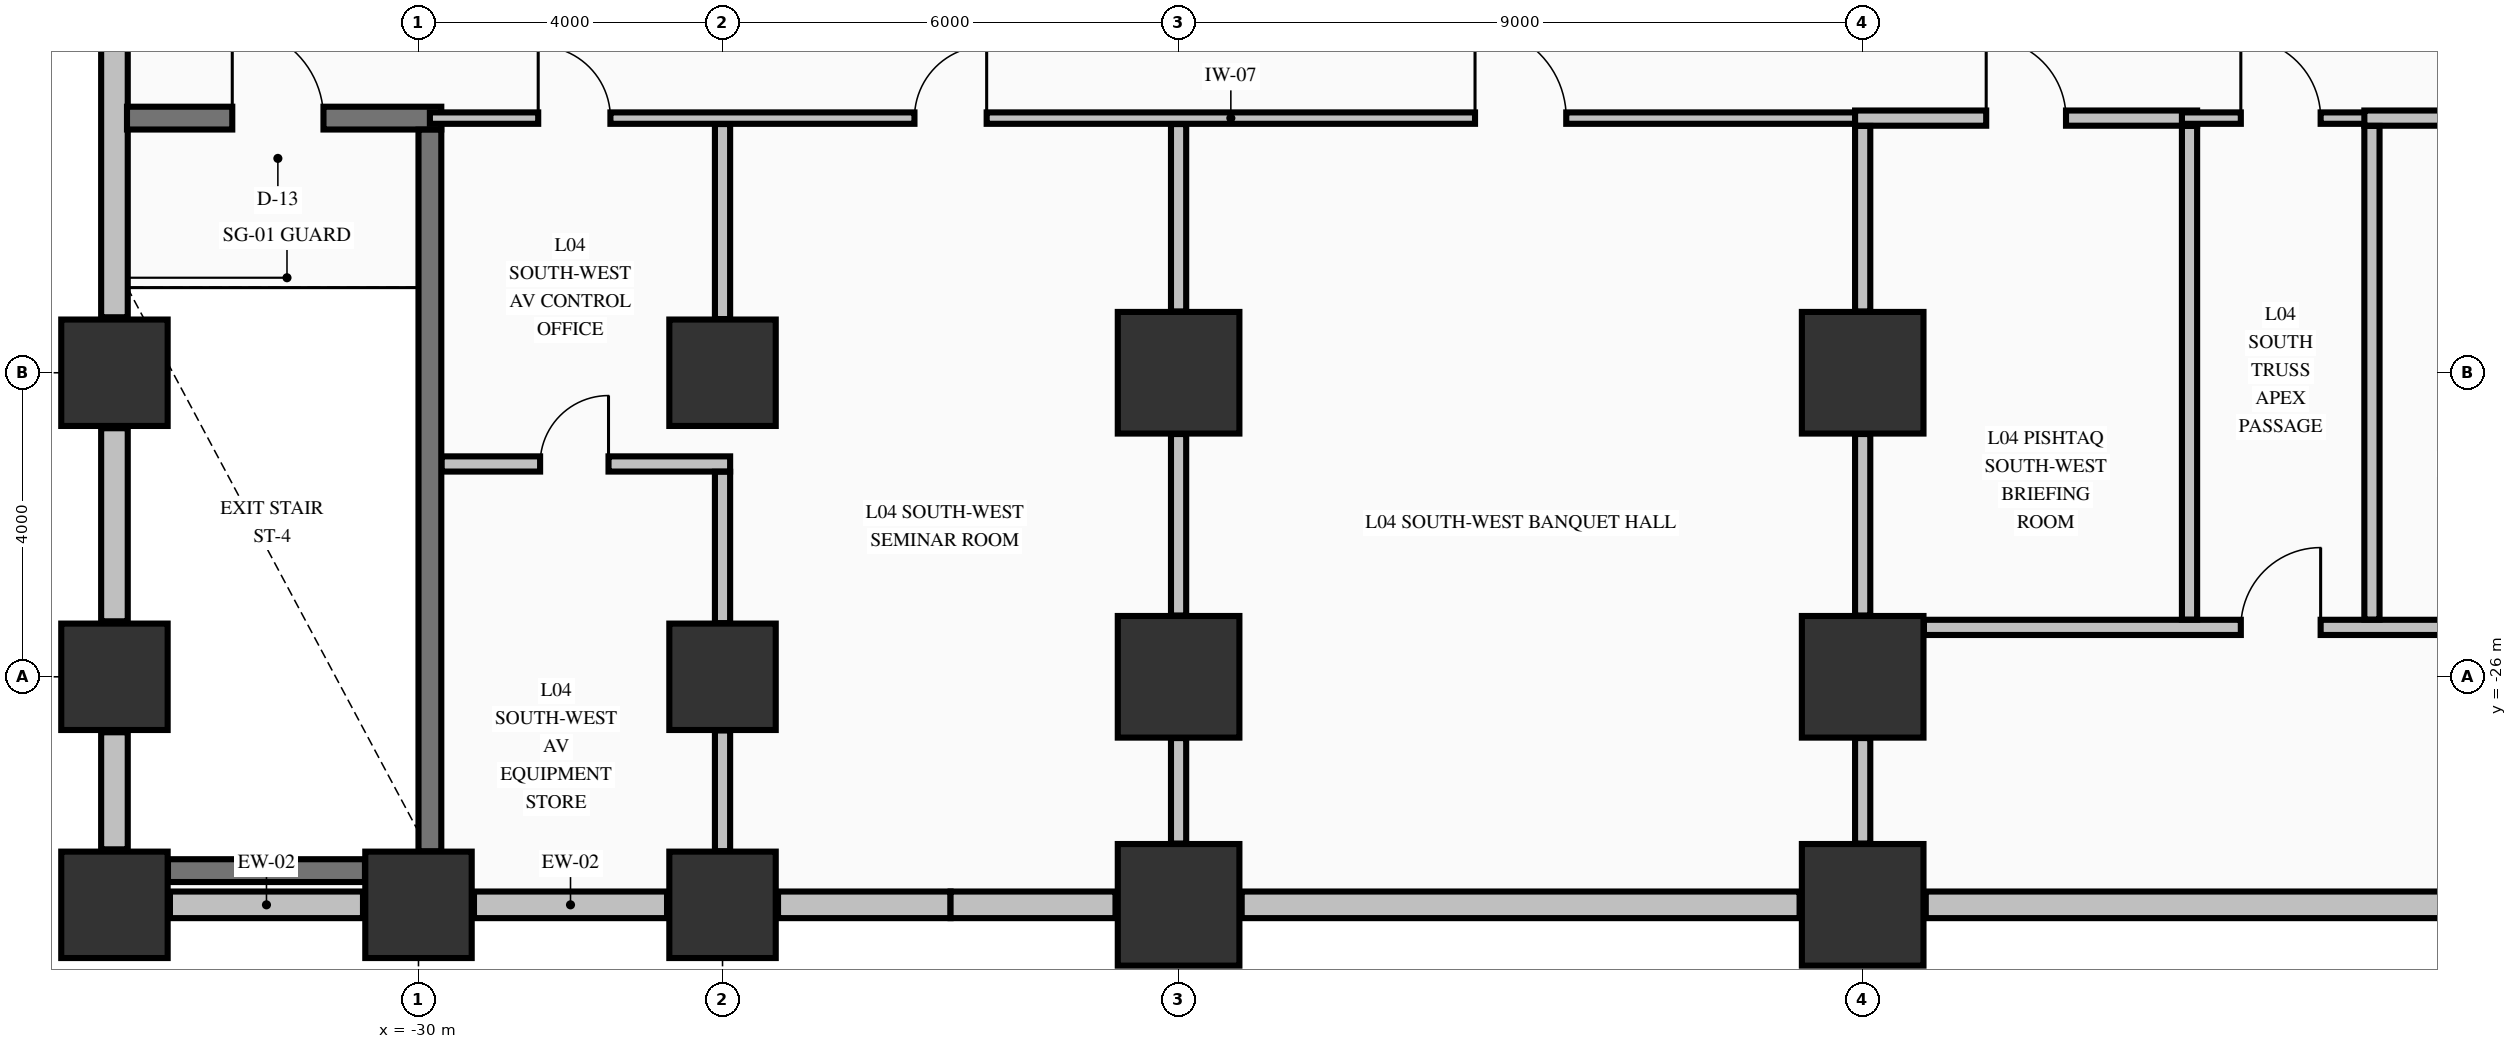
"""IFC4 building model, lengths in metres.
Left out: names, types, materials, properties, quantities, classifications, styles, units other than length and angle.
Written with IfcOpenShell. Run it as: python <this file> out.ifc"""

import sys

from ifc_helpers import new_model, si_unit, direction, frame, frame_2d, origin, origin_2d, place, context, subcontext, project, spatial, rectangle, extrude, element, fill, save


model = new_model("IFC4")
c1 = context("Model", 3, precision=1e-05, world=origin(), true_north=direction((0.0, 1.0)))
c2 = subcontext(c1, "Body", "Model", "MODEL_VIEW")
j1 = project(units=[si_unit("LENGTHUNIT", "METRE"), si_unit("PLANEANGLEUNIT", "RADIAN")], contexts=[c1])
p1 = place(None, origin())
s1 = spatial("IfcSite", under=j1, at=p1, CompositionType="ELEMENT")
p2 = place(p1, origin())
s2 = spatial("IfcBuilding", under=s1, at=p2, CompositionType="ELEMENT")
p3 = place(p2, frame((0.0, 0.0, 21.76)))
s3 = spatial("IfcBuildingStorey", under=s2, at=p3, CompositionType="ELEMENT", Elevation=21.76)
for number, where, z_axis, x_axis in (
    (1, (-34.0, -29.0, -0.45), (0.0, 0.0, 1.0), (1.0, 0.0, 0.0)),
    (2, (-34.0, -26.0, -0.45), (0.0, 0.0, 1.0), (1.0, 0.0, 0.0)),
    (3, (-34.0, -22.0, -0.45), (0.0, 0.0, 1.0), (1.0, 0.0, 0.0)),
    (4, (-30.0, -29.0, -0.45), (0.0, 0.0, 1.0), (1.0, 0.0, 0.0)),
    (5, (-26.0, -29.0, -0.45), (0.0, 0.0, 1.0), (1.0, 0.0, 0.0)),
    (6, (-26.0, -26.0, -0.45), (0.0, 0.0, 1.0), (1.0, 0.0, 0.0)),
    (7, (-26.0, -22.0, -0.45), (0.0, 0.0, 1.0), (1.0, 0.0, 0.0)),
):
    element("IfcColumn", number, at=place(p3, frame(where, z_axis=z_axis, x_axis=x_axis)), inside=s3, PredefinedType="COLUMN", context=c2, shape_type="SweptSolid", body=[
        extrude(rectangle(XDim=1.4, YDim=1.4, at=origin_2d()), origin(), (0.0, 0.0, 1.0), 5.44),
    ])
for number, where, z_axis, x_axis in (
    (8, (-20.0, -29.0, -0.45), (0.0, 0.0, 1.0), (1.0, 0.0, 0.0)),
    (9, (-20.0, -26.0, -0.45), (0.0, 0.0, 1.0), (1.0, 0.0, 0.0)),
    (10, (-20.0, -22.0, -0.45), (0.0, 0.0, 1.0), (1.0, 0.0, 0.0)),
    (11, (-11.0, -29.0, -0.45), (0.0, 0.0, 1.0), (1.0, 0.0, 0.0)),
    (12, (-11.0, -26.0, -0.45), (0.0, 0.0, 1.0), (1.0, 0.0, 0.0)),
    (13, (-11.0, -22.0, -0.45), (0.0, 0.0, 1.0), (1.0, 0.0, 0.0)),
):
    element("IfcColumn", number, at=place(p3, frame(where, z_axis=z_axis, x_axis=x_axis)), inside=s3, PredefinedType="COLUMN", context=c2, shape_type="SweptSolid", body=[
        extrude(rectangle(XDim=1.6, YDim=1.6, at=origin_2d()), origin(), (0.0, 0.0, 1.0), 5.44),
    ])
for number, where, z_axis, x_axis in (
    (14, (-33.27, -29.0, 0.0), (0.0, 0.0, 1.0), (1.0, 0.0, 0.0)),
    (15, (-29.27, -29.0, 0.0), (0.0, 0.0, 1.0), (1.0, 0.0, 0.0)),
):
    element("IfcWall", number, at=place(p3, frame(where, z_axis=z_axis, x_axis=x_axis)), inside=s3, PredefinedType="STANDARD", context=c2, shape_type="SweptSolid", body=[
        extrude(rectangle(XDim=2.54, YDim=0.35, at=frame_2d((1.27, 0.0))), origin(), (0.0, 0.0, 1.0), 3.332),
    ])
p4 = place(p3, frame((-25.27, -29.0, 0.0), z_axis=(0.0, 0.0, 1.0), x_axis=(1.0, 0.0, 0.0)))
e16 = element("IfcWall", 16, at=p4, inside=s3, PredefinedType="STANDARD", context=c2, shape_type="SweptSolid", body=[
    extrude(rectangle(XDim=2.27, YDim=0.35, at=frame_2d((1.135, 0.0))), origin(), (0.0, 0.0, 1.0), 3.332),
])
p5 = place(p3, frame((-23.0, -29.0, 0.0), z_axis=(0.0, 0.0, 1.0), x_axis=(1.0, 0.0, 0.0)))
e17 = element("IfcWall", 17, at=p5, inside=s3, PredefinedType="STANDARD", context=c2, shape_type="SweptSolid", body=[
    extrude(rectangle(XDim=2.17, YDim=0.35, at=frame_2d((1.085, 0.0))), origin(), (0.0, 0.0, 1.0), 3.332),
])
p6 = place(p3, frame((-19.17, -29.0, 0.0), z_axis=(0.0, 0.0, 1.0), x_axis=(1.0, 0.0, 0.0)))
e18 = element("IfcWall", 18, at=p6, inside=s3, PredefinedType="STANDARD", context=c2, shape_type="SweptSolid", body=[
    extrude(rectangle(XDim=7.34, YDim=0.35, at=frame_2d((3.67, 0.0))), origin(), (0.0, 0.0, 1.0), 3.332),
])
p7 = place(p3, frame((-10.17, -29.0, 0.0), z_axis=(0.0, 0.0, 1.0), x_axis=(1.0, 0.0, 0.0)))
e19 = element("IfcWall", 19, at=p7, inside=s3, PredefinedType="STANDARD", context=c2, shape_type="SweptSolid", body=[
    extrude(rectangle(XDim=20.34, YDim=0.35, at=frame_2d((10.17, 0.0))), origin(), (0.0, 0.0, 1.0), 2.582),
])
p8 = place(p3, frame((-34.0, -28.27, 0.0), z_axis=(0.0, 0.0, 1.0), x_axis=(0.0, 1.0, 0.0)))
e20 = element("IfcWall", 20, at=p8, inside=s3, PredefinedType="STANDARD", context=c2, shape_type="SweptSolid", body=[
    extrude(rectangle(XDim=1.54, YDim=0.35, at=frame_2d((0.77, 0.0))), origin(), (0.0, 0.0, 1.0), 4.99),
])
p9 = place(p3, frame((-34.0, -25.27, 0.0), z_axis=(0.0, 0.0, 1.0), x_axis=(0.0, 1.0, 0.0)))
e21 = element("IfcWall", 21, at=p9, inside=s3, PredefinedType="STANDARD", context=c2, shape_type="SweptSolid", body=[
    extrude(rectangle(XDim=2.54, YDim=0.35, at=frame_2d((1.27, 0.0))), origin(), (0.0, 0.0, 1.0), 4.99),
])
p10 = place(p3, frame((-34.0, -21.27, 0.0), z_axis=(0.0, 0.0, 1.0), x_axis=(0.0, 1.0, 0.0)))
e22 = element("IfcWall", 22, at=p10, inside=s3, PredefinedType="STANDARD", context=c2, shape_type="SweptSolid", body=[
    extrude(rectangle(XDim=4.54, YDim=0.35, at=frame_2d((2.27, 0.0))), origin(), (0.0, 0.0, 1.0), 4.99),
])
p11 = place(p3, frame((-33.296, -28.55, 0.0), z_axis=(0.0, 0.0, 1.0), x_axis=(1.0, 0.0, 0.0)))
e23 = element("IfcWall", 23, at=p11, inside=s3, PredefinedType="SHEAR", context=c2, shape_type="SweptSolid", body=[
    extrude(rectangle(XDim=2.592, YDim=0.3, at=frame_2d((1.296, 0.0))), origin(), (0.0, 0.0, 1.0), 4.99),
])
p12 = place(p3, frame((-33.835, -18.65, 0.0), z_axis=(0.0, 0.0, 1.0), x_axis=(1.0, 0.0, 0.0)))
e24 = element("IfcWall", 24, at=p12, inside=s3, PredefinedType="SHEAR", context=c2, shape_type="SweptSolid", body=[
    extrude(rectangle(XDim=4.135, YDim=0.3, at=frame_2d((2.067, 0.0))), origin(), (0.0, 0.0, 1.0), 4.99),
])
p13 = place(p12, frame((1.385, 0.0, 0.0)))
e25 = element("IfcOpeningElement", 25, at=p13, cuts=e24, PredefinedType="OPENING", context=c2, shape_type="SweptSolid", body=[
    extrude(rectangle(XDim=1.2, YDim=2.15, at=frame_2d((0.6, 1.075))), frame((0.0, 0.16, 0.0), z_axis=(0.0, -1.0, 0.0), x_axis=(1.0, 0.0, 0.0)), (0.0, 0.0, 1.0), 0.32),
])
p14 = place(p3, frame((-10.194, -25.35, 0.0), z_axis=(0.0, 0.0, 1.0), x_axis=(1.0, 0.0, 0.0)))
e26 = element("IfcWall", 26, at=p14, inside=s3, PredefinedType="PARTITIONING", context=c2, shape_type="SweptSolid", body=[
    extrude(rectangle(XDim=9.488, YDim=0.2, at=frame_2d((4.744, 0.0))), origin(), (0.0, 0.0, 1.0), 3.332),
])
p15 = place(p14, frame((4.169, 0.0, 0.0)))
e27 = element("IfcOpeningElement", 27, at=p15, cuts=e26, PredefinedType="OPENING", context=c2, shape_type="SweptSolid", body=[
    extrude(rectangle(XDim=1.05, YDim=2.15, at=frame_2d((0.525, 1.075))), frame((0.0, 0.11, 0.0), z_axis=(0.0, -1.0, 0.0), x_axis=(1.0, 0.0, 0.0)), (0.0, 0.0, 1.0), 0.22),
])
p16 = place(p3, frame((-29.697, -23.2, 0.0), z_axis=(0.0, 0.0, 1.0), x_axis=(1.0, 0.0, 0.0)))
e28 = element("IfcWall", 28, at=p16, inside=s3, PredefinedType="PARTITIONING", context=c2, shape_type="SweptSolid", body=[
    extrude(rectangle(XDim=3.797, YDim=0.2, at=frame_2d((1.898, 0.0))), origin(), (0.0, 0.0, 1.0), 4.99),
])
p17 = place(p16, frame((1.297, 0.0, 0.0)))
e29 = element("IfcOpeningElement", 29, at=p17, cuts=e28, PredefinedType="OPENING", context=c2, shape_type="SweptSolid", body=[
    extrude(rectangle(XDim=0.9, YDim=2.15, at=frame_2d((0.45, 1.075))), frame((0.0, 0.11, 0.0), z_axis=(0.0, -1.0, 0.0), x_axis=(1.0, 0.0, 0.0)), (0.0, 0.0, 1.0), 0.22),
])
p18 = place(p3, frame((-29.85, -18.65, 0.0), z_axis=(0.0, 0.0, 1.0), x_axis=(1.0, 0.0, 0.0)))
e30 = element("IfcWall", 30, at=p18, inside=s3, PredefinedType="PARTITIONING", context=c2, shape_type="SweptSolid", body=[
    extrude(rectangle(XDim=18.95, YDim=0.15, at=frame_2d((9.475, 0.0))), origin(), (0.0, 0.0, 1.0), 4.99),
])
p19 = place(p18, frame((1.425, 0.0, 0.0)))
e31 = element("IfcOpeningElement", 31, at=p19, cuts=e30, PredefinedType="OPENING", context=c2, shape_type="SweptSolid", body=[
    extrude(rectangle(XDim=0.95, YDim=2.15, at=frame_2d((0.475, 1.075))), frame((0.0, 0.085, 0.0), z_axis=(0.0, -1.0, 0.0), x_axis=(1.0, 0.0, 0.0)), (0.0, 0.0, 1.0), 0.17),
])
p20 = place(p18, frame((6.375, 0.0, 0.0)))
e32 = element("IfcOpeningElement", 32, at=p20, cuts=e30, PredefinedType="OPENING", context=c2, shape_type="SweptSolid", body=[
    extrude(rectangle(XDim=0.95, YDim=2.15, at=frame_2d((0.475, 1.075))), frame((0.0, 0.085, 0.0), z_axis=(0.0, -1.0, 0.0), x_axis=(1.0, 0.0, 0.0)), (0.0, 0.0, 1.0), 0.17),
])
p21 = place(p18, frame((13.75, 0.0, 0.0)))
e33 = element("IfcOpeningElement", 33, at=p21, cuts=e30, PredefinedType="OPENING", context=c2, shape_type="SweptSolid", body=[
    extrude(rectangle(XDim=1.2, YDim=2.15, at=frame_2d((0.6, 1.075))), frame((0.0, 0.085, 0.0), z_axis=(0.0, -1.0, 0.0), x_axis=(1.0, 0.0, 0.0)), (0.0, 0.0, 1.0), 0.17),
])
p22 = place(p3, frame((-11.1, -18.65, 0.0), z_axis=(0.0, 0.0, 1.0), x_axis=(1.0, 0.0, 0.0)))
e34 = element("IfcWall", 34, at=p22, inside=s3, PredefinedType="PARTITIONING", context=c2, shape_type="SweptSolid", body=[
    extrude(rectangle(XDim=4.5, YDim=0.2, at=frame_2d((2.25, 0.0))), origin(), (0.0, 0.0, 1.0), 4.99),
])
p23 = place(p22, frame((1.725, 0.0, 0.0)))
e35 = element("IfcOpeningElement", 35, at=p23, cuts=e34, PredefinedType="OPENING", context=c2, shape_type="SweptSolid", body=[
    extrude(rectangle(XDim=1.05, YDim=2.15, at=frame_2d((0.525, 1.075))), frame((0.0, 0.11, 0.0), z_axis=(0.0, -1.0, 0.0), x_axis=(1.0, 0.0, 0.0)), (0.0, 0.0, 1.0), 0.22),
])
p24 = place(p3, frame((-6.8, -18.65, 0.0), z_axis=(0.0, 0.0, 1.0), x_axis=(1.0, 0.0, 0.0)))
e36 = element("IfcWall", 36, at=p24, inside=s3, PredefinedType="PARTITIONING", context=c2, shape_type="SweptSolid", body=[
    extrude(rectangle(XDim=2.6, YDim=0.15, at=frame_2d((1.3, 0.0))), origin(), (0.0, 0.0, 1.0), 4.99),
])
p25 = place(p24, frame((0.775, 0.0, 0.0)))
e37 = element("IfcOpeningElement", 37, at=p25, cuts=e36, PredefinedType="OPENING", context=c2, shape_type="SweptSolid", body=[
    extrude(rectangle(XDim=1.05, YDim=2.15, at=frame_2d((0.525, 1.075))), frame((0.0, 0.085, 0.0), z_axis=(0.0, -1.0, 0.0), x_axis=(1.0, 0.0, 0.0)), (0.0, 0.0, 1.0), 0.17),
])
p26 = place(p3, frame((-4.4, -18.65, 0.0), z_axis=(0.0, 0.0, 1.0), x_axis=(1.0, 0.0, 0.0)))
e38 = element("IfcWall", 38, at=p26, inside=s3, PredefinedType="PARTITIONING", context=c2, shape_type="SweptSolid", body=[
    extrude(rectangle(XDim=15.5, YDim=0.2, at=frame_2d((7.75, 0.0))), origin(), (0.0, 0.0, 1.0), 4.99),
])
p27 = place(p26, frame((1.725, 0.0, 0.0)))
e39 = element("IfcOpeningElement", 39, at=p27, cuts=e38, PredefinedType="OPENING", context=c2, shape_type="SweptSolid", body=[
    extrude(rectangle(XDim=1.05, YDim=2.15, at=frame_2d((0.525, 1.075))), frame((0.0, 0.11, 0.0), z_axis=(0.0, -1.0, 0.0), x_axis=(1.0, 0.0, 0.0)), (0.0, 0.0, 1.0), 0.22),
])
p28 = place(p26, frame((9.3, 0.0, 0.0)))
e40 = element("IfcOpeningElement", 40, at=p28, cuts=e38, PredefinedType="OPENING", context=c2, shape_type="SweptSolid", body=[
    extrude(rectangle(XDim=1.2, YDim=2.15, at=frame_2d((0.6, 1.075))), frame((0.0, 0.11, 0.0), z_axis=(0.0, -1.0, 0.0), x_axis=(1.0, 0.0, 0.0)), (0.0, 0.0, 1.0), 0.22),
])
p29 = place(p3, frame((-29.85, -28.296, 0.0), z_axis=(0.0, 0.0, 1.0), x_axis=(0.0, 1.0, 0.0)))
e41 = element("IfcWall", 41, at=p29, inside=s3, PredefinedType="SHEAR", context=c2, shape_type="SweptSolid", body=[
    extrude(rectangle(XDim=9.494, YDim=0.3, at=frame_2d((4.747, 0.0))), origin(), (0.0, 0.0, 1.0), 4.99),
])
p30 = place(p3, frame((-26.0, -28.294, 0.0), z_axis=(0.0, 0.0, 1.0), x_axis=(0.0, 1.0, 0.0)))
e42 = element("IfcWall", 42, at=p30, inside=s3, PredefinedType="PARTITIONING", context=c2, shape_type="SweptSolid", body=[
    extrude(rectangle(XDim=1.588, YDim=0.2, at=frame_2d((0.794, 0.0))), origin(), (0.0, 0.0, 1.0), 3.332),
])
p31 = place(p3, frame((-26.0, -25.294, 0.0), z_axis=(0.0, 0.0, 1.0), x_axis=(0.0, 1.0, 0.0)))
e43 = element("IfcWall", 43, at=p31, inside=s3, PredefinedType="PARTITIONING", context=c2, shape_type="SweptSolid", body=[
    extrude(rectangle(XDim=1.991, YDim=0.2, at=frame_2d((0.996, 0.0))), origin(), (0.0, 0.0, 1.0), 3.332),
])
p32 = place(p3, frame((-26.0, -21.294, 0.0), z_axis=(0.0, 0.0, 1.0), x_axis=(0.0, 1.0, 0.0)))
e44 = element("IfcWall", 44, at=p32, inside=s3, PredefinedType="PARTITIONING", context=c2, shape_type="SweptSolid", body=[
    extrude(rectangle(XDim=2.566, YDim=0.2, at=frame_2d((1.283, 0.0))), origin(), (0.0, 0.0, 1.0), 3.332),
])
p33 = place(p3, frame((-20.0, -28.194, 0.0), z_axis=(0.0, 0.0, 1.0), x_axis=(0.0, 1.0, 0.0)))
e45 = element("IfcWall", 45, at=p33, inside=s3, PredefinedType="PARTITIONING", context=c2, shape_type="SweptSolid", body=[
    extrude(rectangle(XDim=1.388, YDim=0.2, at=frame_2d((0.694, 0.0))), origin(), (0.0, 0.0, 1.0), 3.332),
])
p34 = place(p3, frame((-20.0, -25.194, 0.0), z_axis=(0.0, 0.0, 1.0), x_axis=(0.0, 1.0, 0.0)))
e46 = element("IfcWall", 46, at=p34, inside=s3, PredefinedType="PARTITIONING", context=c2, shape_type="SweptSolid", body=[
    extrude(rectangle(XDim=2.388, YDim=0.2, at=frame_2d((1.194, 0.0))), origin(), (0.0, 0.0, 1.0), 3.332),
])
p35 = place(p3, frame((-20.0, -21.194, 0.0), z_axis=(0.0, 0.0, 1.0), x_axis=(0.0, 1.0, 0.0)))
e47 = element("IfcWall", 47, at=p35, inside=s3, PredefinedType="PARTITIONING", context=c2, shape_type="SweptSolid", body=[
    extrude(rectangle(XDim=2.466, YDim=0.2, at=frame_2d((1.233, 0.0))), origin(), (0.0, 0.0, 1.0), 3.332),
])
p36 = place(p3, frame((-11.0, -28.194, 0.0), z_axis=(0.0, 0.0, 1.0), x_axis=(0.0, 1.0, 0.0)))
e48 = element("IfcWall", 48, at=p36, inside=s3, PredefinedType="PARTITIONING", context=c2, shape_type="SweptSolid", body=[
    extrude(rectangle(XDim=1.388, YDim=0.2, at=frame_2d((0.694, 0.0))), origin(), (0.0, 0.0, 1.0), 3.332),
])
p37 = place(p3, frame((-11.0, -25.194, 0.0), z_axis=(0.0, 0.0, 1.0), x_axis=(0.0, 1.0, 0.0)))
e49 = element("IfcWall", 49, at=p37, inside=s3, PredefinedType="PARTITIONING", context=c2, shape_type="SweptSolid", body=[
    extrude(rectangle(XDim=2.388, YDim=0.2, at=frame_2d((1.194, 0.0))), origin(), (0.0, 0.0, 1.0), 3.332),
])
p38 = place(p3, frame((-11.0, -21.194, 0.0), z_axis=(0.0, 0.0, 1.0), x_axis=(0.0, 1.0, 0.0)))
e50 = element("IfcWall", 50, at=p38, inside=s3, PredefinedType="PARTITIONING", context=c2, shape_type="SweptSolid", body=[
    extrude(rectangle(XDim=2.441, YDim=0.2, at=frame_2d((1.221, 0.0))), origin(), (0.0, 0.0, 1.0), 3.332),
])
for number, where, z_axis, x_axis in (
    (51, (-6.7, -25.247, 0.0), (0.0, 0.0, 1.0), (0.0, 1.0, 0.0)),
    (52, (-4.3, -25.247, 0.0), (0.0, 0.0, 1.0), (0.0, 1.0, 0.0)),
):
    element("IfcWall", number, at=place(p3, frame(where, z_axis=z_axis, x_axis=x_axis)), inside=s3, PredefinedType="PARTITIONING", context=c2, shape_type="SweptSolid", body=[
        extrude(rectangle(XDim=6.494, YDim=0.2, at=frame_2d((3.247, 0.0))), origin(), (0.0, 0.0, 1.0), 4.99),
    ])
p39 = place(p13, origin())
e53 = element("IfcDoor", 53, at=p39, inside=s3, OperationType="SINGLE_SWING_LEFT", PredefinedType="DOOR", context=c2, shape_type="SweptSolid", body=[
    extrude(rectangle(XDim=1.2, YDim=2.15, at=frame_2d((0.6, 1.075))), frame((0.0, 0.025, 0.0), z_axis=(0.0, -1.0, 0.0), x_axis=(1.0, 0.0, 0.0)), (0.0, 0.0, 1.0), 0.05),
])
fill(e25, e53)
p40 = place(p17, origin())
e54 = element("IfcDoor", 54, at=p40, inside=s3, OperationType="SINGLE_SWING_RIGHT", PredefinedType="DOOR", context=c2, shape_type="SweptSolid", body=[
    extrude(rectangle(XDim=0.9, YDim=2.15, at=frame_2d((0.45, 1.075))), frame((0.0, 0.025, 0.0), z_axis=(0.0, -1.0, 0.0), x_axis=(1.0, 0.0, 0.0)), (0.0, 0.0, 1.0), 0.05),
])
fill(e29, e54)
p41 = place(p19, origin())
e55 = element("IfcDoor", 55, at=p41, inside=s3, OperationType="SINGLE_SWING_LEFT", PredefinedType="DOOR", context=c2, shape_type="SweptSolid", body=[
    extrude(rectangle(XDim=0.95, YDim=2.15, at=frame_2d((0.475, 1.075))), frame((0.0, 0.025, 0.0), z_axis=(0.0, -1.0, 0.0), x_axis=(1.0, 0.0, 0.0)), (0.0, 0.0, 1.0), 0.05),
])
fill(e31, e55)
p42 = place(p20, origin())
e56 = element("IfcDoor", 56, at=p42, inside=s3, OperationType="SINGLE_SWING_RIGHT", PredefinedType="DOOR", context=c2, shape_type="SweptSolid", body=[
    extrude(rectangle(XDim=0.95, YDim=2.15, at=frame_2d((0.475, 1.075))), frame((0.0, 0.025, 0.0), z_axis=(0.0, -1.0, 0.0), x_axis=(1.0, 0.0, 0.0)), (0.0, 0.0, 1.0), 0.05),
])
fill(e32, e56)
p43 = place(p21, origin())
e57 = element("IfcDoor", 57, at=p43, inside=s3, OperationType="SINGLE_SWING_LEFT", PredefinedType="DOOR", context=c2, shape_type="SweptSolid", body=[
    extrude(rectangle(XDim=1.2, YDim=2.15, at=frame_2d((0.6, 1.075))), frame((0.0, 0.025, 0.0), z_axis=(0.0, -1.0, 0.0), x_axis=(1.0, 0.0, 0.0)), (0.0, 0.0, 1.0), 0.05),
])
fill(e33, e57)
p44 = place(p25, origin())
e58 = element("IfcDoor", 58, at=p44, inside=s3, OperationType="SINGLE_SWING_LEFT", PredefinedType="DOOR", context=c2, shape_type="SweptSolid", body=[
    extrude(rectangle(XDim=1.05, YDim=2.15, at=frame_2d((0.525, 1.075))), frame((0.0, 0.025, 0.0), z_axis=(0.0, -1.0, 0.0), x_axis=(1.0, 0.0, 0.0)), (0.0, 0.0, 1.0), 0.05),
])
fill(e37, e58)
p45 = place(p15, origin())
e59 = element("IfcDoor", 59, at=p45, inside=s3, OperationType="SINGLE_SWING_RIGHT", PredefinedType="DOOR", context=c2, shape_type="SweptSolid", body=[
    extrude(rectangle(XDim=1.05, YDim=2.15, at=frame_2d((0.525, 1.075))), frame((0.0, 0.025, 0.0), z_axis=(0.0, -1.0, 0.0), x_axis=(1.0, 0.0, 0.0)), (0.0, 0.0, 1.0), 0.05),
])
fill(e27, e59)
p46 = place(p23, origin())
e60 = element("IfcDoor", 60, at=p46, inside=s3, OperationType="SINGLE_SWING_LEFT", PredefinedType="DOOR", context=c2, shape_type="SweptSolid", body=[
    extrude(rectangle(XDim=1.05, YDim=2.15, at=frame_2d((0.525, 1.075))), frame((0.0, 0.025, 0.0), z_axis=(0.0, -1.0, 0.0), x_axis=(1.0, 0.0, 0.0)), (0.0, 0.0, 1.0), 0.05),
])
fill(e35, e60)
save(model, sys.argv[1])
